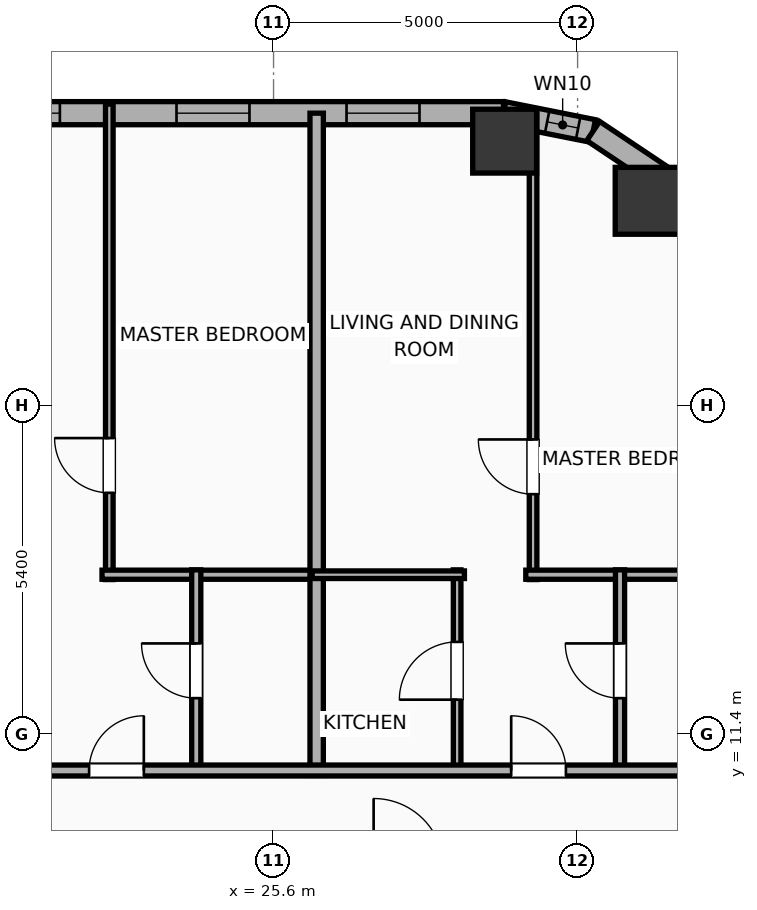
"""IFC4 building model, lengths in metres.
Left out: names, types, materials, properties, quantities, classifications, styles, units other than length and angle.
Written with IfcOpenShell. Run it as: python <this file> out.ifc"""

import sys

from ifc_helpers import new_model, si_unit, direction, frame, frame_2d, origin, origin_2d, place, context, subcontext, project, spatial, rectangle, hollow_rectangle, hollow_circle, extrude, element, fill, save


model = new_model("IFC4")
c1 = context("Model", 3, precision=1e-05, world=origin(), true_north=direction((0.0, 1.0)))
c2 = subcontext(c1, "Body", "Model", "MODEL_VIEW")
j1 = project(units=[si_unit("LENGTHUNIT", "METRE"), si_unit("PLANEANGLEUNIT", "RADIAN")], contexts=[c1])
p1 = place(None, origin())
s1 = spatial("IfcSite", under=j1, at=p1, CompositionType="ELEMENT")
p2 = place(p1, origin())
s2 = spatial("IfcBuilding", under=s1, at=p2, CompositionType="ELEMENT")
p3 = place(p2, frame((0.0, 0.0, 109.2)))
s3 = spatial("IfcBuildingStorey", under=s2, at=p3, CompositionType="ELEMENT", Elevation=109.2)
p4 = place(p3, frame((31.769, 20.169, 0.0), z_axis=(0.0, 0.0, 1.0), x_axis=(1.0, 0.0, 0.0)))
e1 = element("IfcColumn", 1, at=p4, inside=s3, PredefinedType="COLUMN", context=c2, shape_type="SweptSolid", body=[
    extrude(hollow_circle(Radius=0.55, WallThickness=0.036, at=origin_2d()), origin(), (0.0, 0.0, 1.0), 3.9),
])
p5 = place(p3, frame((29.4, 21.15, 0.0), z_axis=(0.0, 0.0, 1.0), x_axis=(1.0, 0.0, 0.0)))
e2 = element("IfcColumn", 2, at=p5, inside=s3, PredefinedType="COLUMN", context=c2, shape_type="SweptSolid", body=[
    extrude(hollow_rectangle(XDim=1.05, YDim=1.05, WallThickness=0.036, at=origin_2d()), origin(), (0.0, 0.0, 1.0), 3.9),
])
p6 = place(p3, frame((-25.381, 21.61, 0.0), z_axis=(0.0, 0.0, 1.0), x_axis=(1.0, 0.0, 0.0)))
e3 = element("IfcWall", 3, at=p6, inside=s3, PredefinedType="ELEMENTEDWALL", context=c2, shape_type="SweptSolid", body=[
    extrude(rectangle(XDim=54.763, YDim=0.38, at=frame_2d((27.381, 0.0))), origin(), (0.0, 0.0, 1.0), 3.65),
])
p7 = place(p6, frame((5.645, 0.0, 0.75)))
e4 = element("IfcOpeningElement", 4, at=p7, cuts=e3, PredefinedType="OPENING", context=c2, shape_type="SweptSolid", body=[
    extrude(rectangle(XDim=2.4, YDim=2.1, at=frame_2d((1.2, 1.05))), frame((0.0, 0.2, 0.0), z_axis=(0.0, -1.0, 0.0), x_axis=(1.0, 0.0, 0.0)), (0.0, 0.0, 1.0), 0.4),
])
p8 = place(p6, frame((45.067, 0.0, 0.75)))
e5 = element("IfcOpeningElement", 5, at=p8, cuts=e3, PredefinedType="OPENING", context=c2, shape_type="SweptSolid", body=[
    extrude(rectangle(XDim=2.4, YDim=2.1, at=frame_2d((1.2, 1.05))), frame((0.0, 0.2, 0.0), z_axis=(0.0, -1.0, 0.0), x_axis=(1.0, 0.0, 0.0)), (0.0, 0.0, 1.0), 0.4),
])
p9 = place(p6, frame((1.831, 0.0, 0.75)))
e6 = element("IfcOpeningElement", 6, at=p9, cuts=e3, PredefinedType="OPENING", context=c2, shape_type="SweptSolid", body=[
    extrude(rectangle(XDim=1.2, YDim=2.05, at=frame_2d((0.6, 1.025))), frame((0.0, 0.2, 0.0), z_axis=(0.0, -1.0, 0.0), x_axis=(1.0, 0.0, 0.0)), (0.0, 0.0, 1.0), 0.4),
])
p10 = place(p6, frame((8.996, 0.0, 0.75)))
e7 = element("IfcOpeningElement", 7, at=p10, cuts=e3, PredefinedType="OPENING", context=c2, shape_type="SweptSolid", body=[
    extrude(rectangle(XDim=1.2, YDim=2.05, at=frame_2d((0.6, 1.025))), frame((0.0, 0.2, 0.0), z_axis=(0.0, -1.0, 0.0), x_axis=(1.0, 0.0, 0.0)), (0.0, 0.0, 1.0), 0.4),
])
p11 = place(p6, frame((15.102, 0.0, 0.75)))
e8 = element("IfcOpeningElement", 8, at=p11, cuts=e3, PredefinedType="OPENING", context=c2, shape_type="SweptSolid", body=[
    extrude(rectangle(XDim=1.2, YDim=2.05, at=frame_2d((0.6, 1.025))), frame((0.0, 0.2, 0.0), z_axis=(0.0, -1.0, 0.0), x_axis=(1.0, 0.0, 0.0)), (0.0, 0.0, 1.0), 0.4),
])
p12 = place(p6, frame((12.352, 0.0, 0.75)))
e9 = element("IfcOpeningElement", 9, at=p12, cuts=e3, PredefinedType="OPENING", context=c2, shape_type="SweptSolid", body=[
    extrude(rectangle(XDim=1.2, YDim=2.05, at=frame_2d((0.6, 1.025))), frame((0.0, 0.2, 0.0), z_axis=(0.0, -1.0, 0.0), x_axis=(1.0, 0.0, 0.0)), (0.0, 0.0, 1.0), 0.4),
])
p13 = place(p6, frame((19.936, 0.0, 0.75)))
e10 = element("IfcOpeningElement", 10, at=p13, cuts=e3, PredefinedType="OPENING", context=c2, shape_type="SweptSolid", body=[
    extrude(rectangle(XDim=1.2, YDim=2.05, at=frame_2d((0.6, 1.025))), frame((0.0, 0.2, 0.0), z_axis=(0.0, -1.0, 0.0), x_axis=(1.0, 0.0, 0.0)), (0.0, 0.0, 1.0), 0.4),
])
p14 = place(p6, frame((17.786, 0.0, 0.75)))
e11 = element("IfcOpeningElement", 11, at=p14, cuts=e3, PredefinedType="OPENING", context=c2, shape_type="SweptSolid", body=[
    extrude(rectangle(XDim=1.2, YDim=2.05, at=frame_2d((0.6, 1.025))), frame((0.0, 0.2, 0.0), z_axis=(0.0, -1.0, 0.0), x_axis=(1.0, 0.0, 0.0)), (0.0, 0.0, 1.0), 0.4),
])
p15 = place(p6, frame((23.826, 0.0, 0.75)))
e12 = element("IfcOpeningElement", 12, at=p15, cuts=e3, PredefinedType="OPENING", context=c2, shape_type="SweptSolid", body=[
    extrude(rectangle(XDim=1.2, YDim=2.05, at=frame_2d((0.6, 1.025))), frame((0.0, 0.2, 0.0), z_axis=(0.0, -1.0, 0.0), x_axis=(1.0, 0.0, 0.0)), (0.0, 0.0, 1.0), 0.4),
])
p16 = place(p6, frame((26.576, 0.0, 0.75)))
e13 = element("IfcOpeningElement", 13, at=p16, cuts=e3, PredefinedType="OPENING", context=c2, shape_type="SweptSolid", body=[
    extrude(rectangle(XDim=1.2, YDim=2.05, at=frame_2d((0.6, 1.025))), frame((0.0, 0.2, 0.0), z_axis=(0.0, -1.0, 0.0), x_axis=(1.0, 0.0, 0.0)), (0.0, 0.0, 1.0), 0.4),
])
p17 = place(p6, frame((30.431, 0.0, 0.75)))
e14 = element("IfcOpeningElement", 14, at=p17, cuts=e3, PredefinedType="OPENING", context=c2, shape_type="SweptSolid", body=[
    extrude(rectangle(XDim=1.2, YDim=2.05, at=frame_2d((0.6, 1.025))), frame((0.0, 0.2, 0.0), z_axis=(0.0, -1.0, 0.0), x_axis=(1.0, 0.0, 0.0)), (0.0, 0.0, 1.0), 0.4),
])
p18 = place(p6, frame((38.581, 0.0, 0.75)))
e15 = element("IfcOpeningElement", 15, at=p18, cuts=e3, PredefinedType="OPENING", context=c2, shape_type="SweptSolid", body=[
    extrude(rectangle(XDim=1.2, YDim=2.05, at=frame_2d((0.6, 1.025))), frame((0.0, 0.2, 0.0), z_axis=(0.0, -1.0, 0.0), x_axis=(1.0, 0.0, 0.0)), (0.0, 0.0, 1.0), 0.4),
])
p19 = place(p6, frame((34.786, 0.0, 0.75)))
e16 = element("IfcOpeningElement", 16, at=p19, cuts=e3, PredefinedType="OPENING", context=c2, shape_type="SweptSolid", body=[
    extrude(rectangle(XDim=1.2, YDim=2.05, at=frame_2d((0.6, 1.025))), frame((0.0, 0.2, 0.0), z_axis=(0.0, -1.0, 0.0), x_axis=(1.0, 0.0, 0.0)), (0.0, 0.0, 1.0), 0.4),
])
p20 = place(p6, frame((41.876, 0.0, 0.75)))
e17 = element("IfcOpeningElement", 17, at=p20, cuts=e3, PredefinedType="OPENING", context=c2, shape_type="SweptSolid", body=[
    extrude(rectangle(XDim=1.2, YDim=2.05, at=frame_2d((0.6, 1.025))), frame((0.0, 0.2, 0.0), z_axis=(0.0, -1.0, 0.0), x_axis=(1.0, 0.0, 0.0)), (0.0, 0.0, 1.0), 0.4),
])
p21 = place(p6, frame((49.385, 0.0, 0.75)))
e18 = element("IfcOpeningElement", 18, at=p21, cuts=e3, PredefinedType="OPENING", context=c2, shape_type="SweptSolid", body=[
    extrude(rectangle(XDim=1.2, YDim=2.05, at=frame_2d((0.6, 1.025))), frame((0.0, 0.2, 0.0), z_axis=(0.0, -1.0, 0.0), x_axis=(1.0, 0.0, 0.0)), (0.0, 0.0, 1.0), 0.4),
])
p22 = place(p6, frame((52.181, 0.0, 0.75)))
e19 = element("IfcOpeningElement", 19, at=p22, cuts=e3, PredefinedType="OPENING", context=c2, shape_type="SweptSolid", body=[
    extrude(rectangle(XDim=1.2, YDim=2.05, at=frame_2d((0.6, 1.025))), frame((0.0, 0.2, 0.0), z_axis=(0.0, -1.0, 0.0), x_axis=(1.0, 0.0, 0.0)), (0.0, 0.0, 1.0), 0.4),
])
p23 = place(p3, frame((29.381, 21.61, 0.0), z_axis=(0.0, 0.0, 1.0), x_axis=(0.980755066645, -0.195242155415, 0.0)))
e20 = element("IfcWall", 20, at=p23, inside=s3, PredefinedType="ELEMENTEDWALL", context=c2, shape_type="SweptSolid", body=[
    extrude(rectangle(XDim=1.504, YDim=0.38, at=frame_2d((0.752, 0.0))), origin(), (0.0, 0.0, 1.0), 3.65),
])
p24 = place(p23, frame((0.732, 0.0, 0.75)))
e21 = element("IfcOpeningElement", 21, at=p24, cuts=e20, PredefinedType="OPENING", context=c2, shape_type="SweptSolid", body=[
    extrude(rectangle(XDim=0.52, YDim=2.05, at=frame_2d((0.26, 1.025))), frame((0.0, 0.2, 0.0), z_axis=(0.0, -1.0, 0.0), x_axis=(1.0, 0.0, 0.0)), (0.0, 0.0, 1.0), 0.4),
])
p25 = place(p3, frame((30.857, 21.316, 0.0), z_axis=(0.0, 0.0, 1.0), x_axis=(0.831468045563, -0.555572577804, 0.0)))
e22 = element("IfcWall", 22, at=p25, inside=s3, PredefinedType="ELEMENTEDWALL", context=c2, shape_type="SweptSolid", body=[
    extrude(rectangle(XDim=1.485, YDim=0.38, at=frame_2d((0.742, 0.0))), origin(), (0.0, 0.0, 1.0), 3.65),
])
p26 = place(p3, frame((32.091, 20.491, 0.0), z_axis=(0.0, 0.0, 1.0), x_axis=(0.555610286119, -0.831442848281, 0.0)))
e23 = element("IfcWall", 23, at=p26, inside=s3, PredefinedType="ELEMENTEDWALL", context=c2, shape_type="SweptSolid", body=[
    extrude(rectangle(XDim=1.485, YDim=0.38, at=frame_2d((0.743, 0.0))), origin(), (0.0, 0.0, 1.0), 3.65),
])
p27 = place(p3, frame((22.899, 13.94, 0.0), z_axis=(0.0, 0.0, 1.0), x_axis=(0.0, 1.0, 0.0)))
e24 = element("IfcWall", 24, at=p27, inside=s3, PredefinedType="PARTITIONING", context=c2, shape_type="SweptSolid", body=[
    extrude(rectangle(XDim=7.82, YDim=0.125, at=frame_2d((3.91, 0.0))), origin(), (0.0, 0.0, 1.0), 3.65),
])
p28 = place(p27, frame((1.427, 0.0, 0.0)))
e25 = element("IfcOpeningElement", 25, at=p28, cuts=e24, PredefinedType="OPENING", context=c2, shape_type="SweptSolid", body=[
    extrude(rectangle(XDim=0.9, YDim=2.05, at=frame_2d((0.45, 1.025))), frame((0.0, 0.073, 0.0), z_axis=(0.0, -1.0, 0.0), x_axis=(1.0, 0.0, 0.0)), (0.0, 0.0, 1.0), 0.145),
])
p29 = place(p3, frame((22.779, 14.02, 0.0), z_axis=(0.0, 0.0, 1.0), x_axis=(1.0, 0.0, 0.0)))
e26 = element("IfcWall", 26, at=p29, inside=s3, PredefinedType="PLUMBINGWALL", context=c2, shape_type="SweptSolid", body=[
    extrude(rectangle(XDim=3.605, YDim=0.15, at=frame_2d((1.802, 0.0))), origin(), (0.0, 0.0, 1.0), 3.65),
])
p30 = place(p3, frame((24.329, 10.78, 0.0), z_axis=(0.0, 0.0, 1.0), x_axis=(0.0, 1.0, 0.0)))
e27 = element("IfcWall", 27, at=p30, inside=s3, PredefinedType="PLUMBINGWALL", context=c2, shape_type="SweptSolid", body=[
    extrude(rectangle(XDim=3.32, YDim=0.15, at=frame_2d((1.66, 0.0))), origin(), (0.0, 0.0, 1.0), 3.65),
])
p31 = place(p30, frame((1.21, 0.0, 0.0)))
e28 = element("IfcOpeningElement", 28, at=p31, cuts=e27, PredefinedType="OPENING", context=c2, shape_type="SweptSolid", body=[
    extrude(rectangle(XDim=0.9, YDim=2.05, at=frame_2d((0.45, 1.025))), frame((0.0, 0.085, 0.0), z_axis=(0.0, -1.0, 0.0), x_axis=(1.0, 0.0, 0.0)), (0.0, 0.0, 1.0), 0.17),
])
p32 = place(p3, frame((26.309, 10.72, 0.0), z_axis=(0.0, 0.0, 1.0), x_axis=(0.0, 1.0, 0.0)))
e29 = element("IfcWall", 29, at=p32, inside=s3, PredefinedType="PARTITIONING", context=c2, shape_type="SweptSolid", body=[
    extrude(rectangle(XDim=10.89, YDim=0.22, at=frame_2d((5.445, 0.0))), origin(), (0.0, 0.0, 1.0), 3.65),
])
p33 = place(p3, frame((29.868, 13.94, 0.0), z_axis=(0.0, 0.0, 1.0), x_axis=(0.0, 1.0, 0.0)))
e30 = element("IfcWall", 30, at=p33, inside=s3, PredefinedType="PARTITIONING", context=c2, shape_type="SweptSolid", body=[
    extrude(rectangle(XDim=7.726, YDim=0.125, at=frame_2d((3.863, 0.0))), origin(), (0.0, 0.0, 1.0), 3.65),
])
p34 = place(p33, frame((1.404, 0.0, 0.0)))
e31 = element("IfcOpeningElement", 31, at=p34, cuts=e30, PredefinedType="OPENING", context=c2, shape_type="SweptSolid", body=[
    extrude(rectangle(XDim=0.9, YDim=2.05, at=frame_2d((0.45, 1.025))), frame((0.0, 0.073, 0.0), z_axis=(0.0, -1.0, 0.0), x_axis=(1.0, 0.0, 0.0)), (0.0, 0.0, 1.0), 0.145),
])
p35 = place(p3, frame((29.748, 14.02, 0.0), z_axis=(0.0, 0.0, 1.0), x_axis=(1.0, 0.0, 0.0)))
e32 = element("IfcWall", 32, at=p35, inside=s3, PredefinedType="PLUMBINGWALL", context=c2, shape_type="SweptSolid", body=[
    extrude(rectangle(XDim=3.612, YDim=0.15, at=frame_2d((1.806, 0.0))), origin(), (0.0, 0.0, 1.0), 3.65),
])
p36 = place(p3, frame((28.619, 10.78, 0.0), z_axis=(0.0, 0.0, 1.0), x_axis=(0.0, 1.0, 0.0)))
e33 = element("IfcWall", 33, at=p36, inside=s3, PredefinedType="PARTITIONING", context=c2, shape_type="SweptSolid", body=[
    extrude(rectangle(XDim=3.32, YDim=0.125, at=frame_2d((1.66, 0.0))), origin(), (0.0, 0.0, 1.0), 3.65),
])
p37 = place(p36, frame((1.185, 0.0, 0.0)))
e34 = element("IfcOpeningElement", 34, at=p37, cuts=e33, PredefinedType="OPENING", context=c2, shape_type="SweptSolid", body=[
    extrude(rectangle(XDim=0.95, YDim=2.05, at=frame_2d((0.475, 1.025))), frame((0.0, 0.073, 0.0), z_axis=(0.0, -1.0, 0.0), x_axis=(1.0, 0.0, 0.0)), (0.0, 0.0, 1.0), 0.145),
])
p38 = place(p3, frame((26.234, 14.02, 0.0), z_axis=(0.0, 0.0, 1.0), x_axis=(1.0, 0.0, 0.0)))
e35 = element("IfcWall", 35, at=p38, inside=s3, PredefinedType="PARTITIONING", context=c2, shape_type="SweptSolid", body=[
    extrude(rectangle(XDim=2.505, YDim=0.125, at=frame_2d((1.252, 0.0))), origin(), (0.0, 0.0, 1.0), 3.65),
])
p39 = place(p3, frame((31.298, 10.78, 0.0), z_axis=(0.0, 0.0, 1.0), x_axis=(0.0, 1.0, 0.0)))
e36 = element("IfcWall", 36, at=p39, inside=s3, PredefinedType="PLUMBINGWALL", context=c2, shape_type="SweptSolid", body=[
    extrude(rectangle(XDim=3.32, YDim=0.15, at=frame_2d((1.66, 0.0))), origin(), (0.0, 0.0, 1.0), 3.65),
])
p40 = place(p39, frame((1.21, 0.0, 0.0)))
e37 = element("IfcOpeningElement", 37, at=p40, cuts=e36, PredefinedType="OPENING", context=c2, shape_type="SweptSolid", body=[
    extrude(rectangle(XDim=0.9, YDim=2.05, at=frame_2d((0.45, 1.025))), frame((0.0, 0.085, 0.0), z_axis=(0.0, -1.0, 0.0), x_axis=(1.0, 0.0, 0.0)), (0.0, 0.0, 1.0), 0.17),
])
p41 = place(p3, frame((-29.21, 10.8, 0.0), z_axis=(0.0, 0.0, 1.0), x_axis=(1.0, 0.0, 0.0)))
e38 = element("IfcWall", 38, at=p41, inside=s3, PredefinedType="PARTITIONING", context=c2, shape_type="SweptSolid", body=[
    extrude(rectangle(XDim=62.42, YDim=0.18, at=frame_2d((31.21, 0.0))), origin(), (0.0, 0.0, 1.0), 3.65),
])
p42 = place(p41, frame((3.457, 0.0, 0.0)))
e39 = element("IfcOpeningElement", 39, at=p42, cuts=e38, PredefinedType="OPENING", context=c2, shape_type="SweptSolid", body=[
    extrude(rectangle(XDim=1.15, YDim=2.05, at=frame_2d((0.575, 1.025))), frame((0.0, 0.1, 0.0), z_axis=(0.0, -1.0, 0.0), x_axis=(1.0, 0.0, 0.0)), (0.0, 0.0, 1.0), 0.2),
])
p43 = place(p41, frame((11.297, 0.0, 0.0)))
e40 = element("IfcOpeningElement", 40, at=p43, cuts=e38, PredefinedType="OPENING", context=c2, shape_type="SweptSolid", body=[
    extrude(rectangle(XDim=1.15, YDim=2.05, at=frame_2d((0.575, 1.025))), frame((0.0, 0.1, 0.0), z_axis=(0.0, -1.0, 0.0), x_axis=(1.0, 0.0, 0.0)), (0.0, 0.0, 1.0), 0.2),
])
p44 = place(p41, frame((18.925, 0.0, 0.0)))
e41 = element("IfcOpeningElement", 41, at=p44, cuts=e38, PredefinedType="OPENING", context=c2, shape_type="SweptSolid", body=[
    extrude(rectangle(XDim=1.15, YDim=2.05, at=frame_2d((0.575, 1.025))), frame((0.0, 0.1, 0.0), z_axis=(0.0, -1.0, 0.0), x_axis=(1.0, 0.0, 0.0)), (0.0, 0.0, 1.0), 0.2),
])
p45 = place(p41, frame((24.362, 0.0, 0.0)))
e42 = element("IfcOpeningElement", 42, at=p45, cuts=e38, PredefinedType="OPENING", context=c2, shape_type="SweptSolid", body=[
    extrude(rectangle(XDim=1.15, YDim=2.05, at=frame_2d((0.575, 1.025))), frame((0.0, 0.1, 0.0), z_axis=(0.0, -1.0, 0.0), x_axis=(1.0, 0.0, 0.0)), (0.0, 0.0, 1.0), 0.2),
])
p46 = place(p41, frame((27.708, 0.0, 0.0)))
e43 = element("IfcOpeningElement", 43, at=p46, cuts=e38, PredefinedType="OPENING", context=c2, shape_type="SweptSolid", body=[
    extrude(rectangle(XDim=1.15, YDim=2.05, at=frame_2d((0.575, 1.025))), frame((0.0, 0.1, 0.0), z_axis=(0.0, -1.0, 0.0), x_axis=(1.0, 0.0, 0.0)), (0.0, 0.0, 1.0), 0.2),
])
p47 = place(p41, frame((34.618, 0.0, 0.0)))
e44 = element("IfcOpeningElement", 44, at=p47, cuts=e38, PredefinedType="OPENING", context=c2, shape_type="SweptSolid", body=[
    extrude(rectangle(XDim=0.9, YDim=2.05, at=frame_2d((0.45, 1.025))), frame((0.0, 0.1, 0.0), z_axis=(0.0, -1.0, 0.0), x_axis=(1.0, 0.0, 0.0)), (0.0, 0.0, 1.0), 0.2),
])
p48 = place(p41, frame((43.106, 0.0, 0.0)))
e45 = element("IfcOpeningElement", 45, at=p48, cuts=e38, PredefinedType="OPENING", context=c2, shape_type="SweptSolid", body=[
    extrude(rectangle(XDim=1.15, YDim=2.05, at=frame_2d((0.575, 1.025))), frame((0.0, 0.1, 0.0), z_axis=(0.0, -1.0, 0.0), x_axis=(1.0, 0.0, 0.0)), (0.0, 0.0, 1.0), 0.2),
])
p49 = place(p41, frame((51.777, 0.0, 0.0)))
e46 = element("IfcOpeningElement", 46, at=p49, cuts=e38, PredefinedType="OPENING", context=c2, shape_type="SweptSolid", body=[
    extrude(rectangle(XDim=0.9, YDim=2.05, at=frame_2d((0.45, 1.025))), frame((0.0, 0.1, 0.0), z_axis=(0.0, -1.0, 0.0), x_axis=(1.0, 0.0, 0.0)), (0.0, 0.0, 1.0), 0.2),
])
p50 = place(p41, frame((58.718, 0.0, 0.0)))
e47 = element("IfcOpeningElement", 47, at=p50, cuts=e38, PredefinedType="OPENING", context=c2, shape_type="SweptSolid", body=[
    extrude(rectangle(XDim=0.9, YDim=2.05, at=frame_2d((0.45, 1.025))), frame((0.0, 0.1, 0.0), z_axis=(0.0, -1.0, 0.0), x_axis=(1.0, 0.0, 0.0)), (0.0, 0.0, 1.0), 0.2),
])
p51 = place(p8, origin())
e48 = element("IfcWindow", 48, at=p51, inside=s3, PartitioningType="SINGLE_PANEL", PredefinedType="WINDOW", context=c2, shape_type="SweptSolid", body=[
    extrude(rectangle(XDim=2.4, YDim=2.1, at=frame_2d((1.2, 1.05))), frame((0.0, 0.03, 0.0), z_axis=(0.0, -1.0, 0.0), x_axis=(1.0, 0.0, 0.0)), (0.0, 0.0, 1.0), 0.06),
])
fill(e5, e48)
p52 = place(p21, origin())
e49 = element("IfcWindow", 49, at=p52, inside=s3, PartitioningType="SINGLE_PANEL", PredefinedType="WINDOW", context=c2, shape_type="SweptSolid", body=[
    extrude(rectangle(XDim=1.2, YDim=2.05, at=frame_2d((0.6, 1.025))), frame((0.0, 0.03, 0.0), z_axis=(0.0, -1.0, 0.0), x_axis=(1.0, 0.0, 0.0)), (0.0, 0.0, 1.0), 0.06),
])
fill(e18, e49)
p53 = place(p22, origin())
e50 = element("IfcWindow", 50, at=p53, inside=s3, PartitioningType="SINGLE_PANEL", PredefinedType="WINDOW", context=c2, shape_type="SweptSolid", body=[
    extrude(rectangle(XDim=1.2, YDim=2.05, at=frame_2d((0.6, 1.025))), frame((0.0, 0.03, 0.0), z_axis=(0.0, -1.0, 0.0), x_axis=(1.0, 0.0, 0.0)), (0.0, 0.0, 1.0), 0.06),
])
fill(e19, e50)
p54 = place(p24, origin())
e51 = element("IfcWindow", 51, at=p54, inside=s3, PartitioningType="SINGLE_PANEL", PredefinedType="WINDOW", context=c2, shape_type="SweptSolid", body=[
    extrude(rectangle(XDim=0.52, YDim=2.05, at=frame_2d((0.26, 1.025))), frame((0.0, 0.03, 0.0), z_axis=(0.0, -1.0, 0.0), x_axis=(1.0, 0.0, 0.0)), (0.0, 0.0, 1.0), 0.06),
])
fill(e21, e51)
p55 = place(p28, origin())
e52 = element("IfcDoor", 52, at=p55, inside=s3, OperationType="SINGLE_SWING_RIGHT", PredefinedType="DOOR", context=c2, shape_type="SweptSolid", body=[
    extrude(rectangle(XDim=0.9, YDim=2.05, at=frame_2d((0.45, 1.025))), frame((0.0, 0.025, 0.0), z_axis=(0.0, -1.0, 0.0), x_axis=(1.0, 0.0, 0.0)), (0.0, 0.0, 1.0), 0.05),
])
fill(e25, e52)
p56 = place(p31, origin())
e53 = element("IfcDoor", 53, at=p56, inside=s3, OperationType="SINGLE_SWING_RIGHT", PredefinedType="DOOR", context=c2, shape_type="SweptSolid", body=[
    extrude(rectangle(XDim=0.9, YDim=2.05, at=frame_2d((0.45, 1.025))), frame((0.0, 0.025, 0.0), z_axis=(0.0, -1.0, 0.0), x_axis=(1.0, 0.0, 0.0)), (0.0, 0.0, 1.0), 0.05),
])
fill(e28, e53)
p57 = place(p34, origin())
e54 = element("IfcDoor", 54, at=p57, inside=s3, OperationType="SINGLE_SWING_RIGHT", PredefinedType="DOOR", context=c2, shape_type="SweptSolid", body=[
    extrude(rectangle(XDim=0.9, YDim=2.05, at=frame_2d((0.45, 1.025))), frame((0.0, 0.025, 0.0), z_axis=(0.0, -1.0, 0.0), x_axis=(1.0, 0.0, 0.0)), (0.0, 0.0, 1.0), 0.05),
])
fill(e31, e54)
p58 = place(p37, origin())
e55 = element("IfcDoor", 55, at=p58, inside=s3, OperationType="SINGLE_SWING_LEFT", PredefinedType="DOOR", context=c2, shape_type="SweptSolid", body=[
    extrude(rectangle(XDim=0.95, YDim=2.05, at=frame_2d((0.475, 1.025))), frame((0.0, 0.025, 0.0), z_axis=(0.0, -1.0, 0.0), x_axis=(1.0, 0.0, 0.0)), (0.0, 0.0, 1.0), 0.05),
])
fill(e34, e55)
p59 = place(p40, origin())
e56 = element("IfcDoor", 56, at=p59, inside=s3, OperationType="SINGLE_SWING_RIGHT", PredefinedType="DOOR", context=c2, shape_type="SweptSolid", body=[
    extrude(rectangle(XDim=0.9, YDim=2.05, at=frame_2d((0.45, 1.025))), frame((0.0, 0.025, 0.0), z_axis=(0.0, -1.0, 0.0), x_axis=(1.0, 0.0, 0.0)), (0.0, 0.0, 1.0), 0.05),
])
fill(e37, e56)
p60 = place(p49, origin())
e57 = element("IfcDoor", 57, at=p60, inside=s3, OperationType="SINGLE_SWING_RIGHT", PredefinedType="DOOR", context=c2, shape_type="SweptSolid", body=[
    extrude(rectangle(XDim=0.9, YDim=2.05, at=frame_2d((0.45, 1.025))), frame((0.0, 0.025, 0.0), z_axis=(0.0, -1.0, 0.0), x_axis=(1.0, 0.0, 0.0)), (0.0, 0.0, 1.0), 0.05),
])
fill(e46, e57)
p61 = place(p50, origin())
e58 = element("IfcDoor", 58, at=p61, inside=s3, OperationType="SINGLE_SWING_LEFT", PredefinedType="DOOR", context=c2, shape_type="SweptSolid", body=[
    extrude(rectangle(XDim=0.9, YDim=2.05, at=frame_2d((0.45, 1.025))), frame((0.0, 0.025, 0.0), z_axis=(0.0, -1.0, 0.0), x_axis=(1.0, 0.0, 0.0)), (0.0, 0.0, 1.0), 0.05),
])
fill(e47, e58)
save(model, sys.argv[1])
